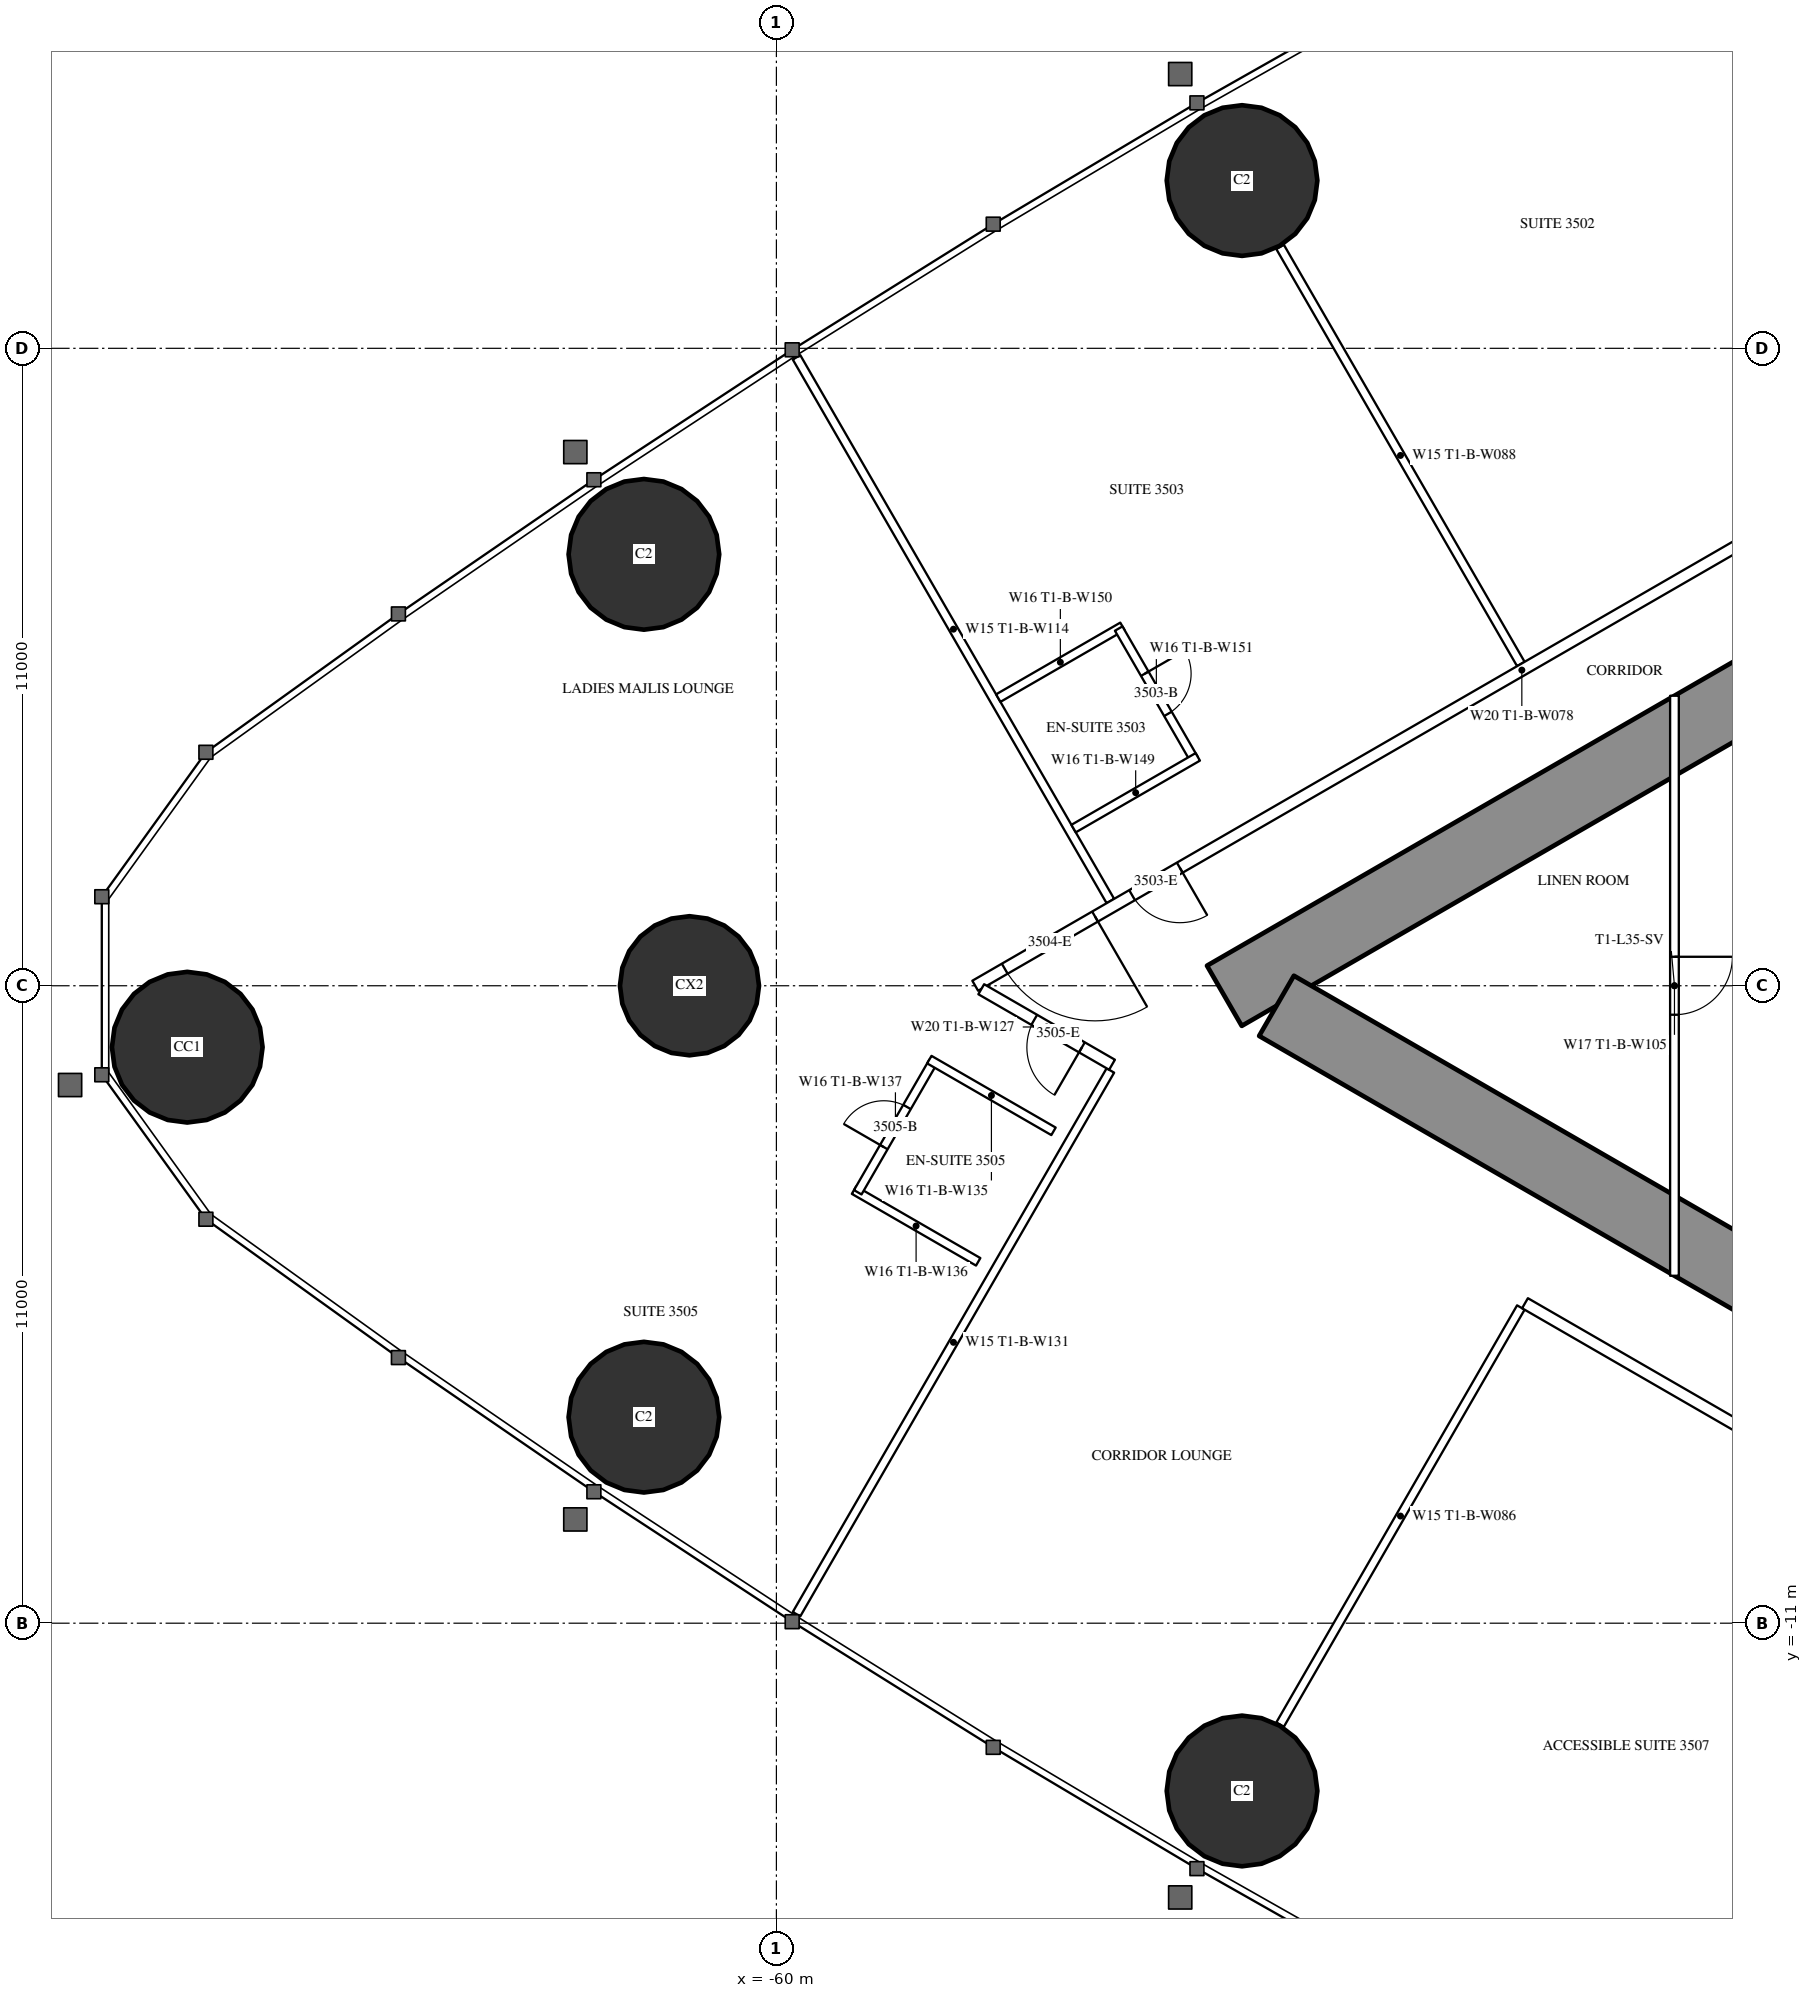
"""IFC4 building model, lengths in metres.
Left out: names, types, materials, properties, quantities, classifications, styles, units other than length and angle.
Written with IfcOpenShell. Run it as: python <this file> out.ifc"""

import sys

from ifc_helpers import new_model, si_unit, direction, frame, frame_2d, origin, origin_2d, place, context, subcontext, project, spatial, rectangle, circle, hollow_circle, extrude, element, fill, save


model = new_model("IFC4")
c1 = context("Model", 3, precision=1e-05, world=origin(), true_north=direction((0.0, 1.0)))
c2 = subcontext(c1, "Body", "Model", "MODEL_VIEW")
j1 = project(units=[si_unit("LENGTHUNIT", "METRE"), si_unit("PLANEANGLEUNIT", "RADIAN")], contexts=[c1])
p1 = place(None, origin())
s1 = spatial("IfcSite", under=j1, at=p1, CompositionType="ELEMENT")
p2 = place(p1, origin())
s2 = spatial("IfcBuilding", under=s1, at=p2, CompositionType="ELEMENT")
p3 = place(p2, frame((0.0, 0.0, 132.6)))
s3 = spatial("IfcBuildingStorey", under=s2, at=p3, CompositionType="ELEMENT", Elevation=132.6)
for number, where, z_axis, x_axis in (
    (1, (-70.168, -1.06, 0.0), (0.0, 0.0, 1.0), (1.0, 0.0, 0.0)),
    (2, (-62.287, -7.445, 0.0), (0.0, 0.0, 1.0), (1.0, 0.0, 0.0)),
    (3, (-51.963, -13.895, 0.0), (0.0, 0.0, 1.0), (1.0, 0.0, 0.0)),
    (4, (-51.963, 13.895, 0.0), (0.0, 0.0, 1.0), (1.0, 0.0, 0.0)),
    (5, (-62.287, 7.445, 0.0), (0.0, 0.0, 1.0), (1.0, 0.0, 0.0)),
):
    element("IfcColumn", number, at=place(p3, frame(where, z_axis=z_axis, x_axis=x_axis)), inside=s3, PredefinedType="COLUMN", context=c2, shape_type="SweptSolid", body=[
        extrude(hollow_circle(Radius=1.3, WallThickness=0.1, at=origin_2d()), origin(), (0.0, 0.0, 1.0), 3.5),
    ])
p4 = place(p3, frame((-61.5, 0.0, 0.0), z_axis=(0.0, 0.0, 1.0), x_axis=(1.0, 0.0, 0.0)))
e6 = element("IfcColumn", 6, at=p4, inside=s3, PredefinedType="COLUMN", context=c2, shape_type="SweptSolid", body=[
    extrude(circle(Radius=1.2, at=origin_2d()), origin(), (0.0, 0.0, 1.0), 3.5),
])
p5 = place(p3, frame((-27.2, 14.3, 0.0), z_axis=(0.0, 0.0, 1.0), x_axis=(-0.866026593062, -0.499997940104, 0.0)))
e7 = element("IfcWall", 7, at=p5, inside=s3, PredefinedType="SHEAR", context=c2, shape_type="SweptSolid", body=[
    extrude(rectangle(XDim=28.946, YDim=1.2, at=frame_2d((14.473, 0.0))), origin(), (0.0, 0.0, 1.0), 3.5),
])
p6 = place(p5, frame((4.6, 0.0, 0.0)))
e8 = element("IfcOpeningElement", 8, at=p6, cuts=e7, PredefinedType="OPENING", context=c2, shape_type="SweptSolid", body=[
    extrude(rectangle(XDim=1.0, YDim=2.2, at=frame_2d((0.5, 1.1))), frame((0.0, 0.61, 0.0), z_axis=(0.0, -1.0, 0.0), x_axis=(1.0, 0.0, 0.0)), (0.0, 0.0, 1.0), 1.22),
])
p7 = place(p5, frame((13.395, 0.0, 0.0)))
e9 = element("IfcOpeningElement", 9, at=p7, cuts=e7, PredefinedType="OPENING", context=c2, shape_type="SweptSolid", body=[
    extrude(rectangle(XDim=1.8, YDim=2.2, at=frame_2d((0.9, 1.1))), frame((0.0, 0.61, 0.0), z_axis=(0.0, -1.0, 0.0), x_axis=(1.0, 0.0, 0.0)), (0.0, 0.0, 1.0), 1.22),
])
p8 = place(p3, frame((-27.2, -14.3, 0.0), z_axis=(0.0, 0.0, 1.0), x_axis=(-0.866024021859, 0.500002393557, 0.0)))
e10 = element("IfcWall", 10, at=p8, inside=s3, PredefinedType="SHEAR", context=c2, shape_type="SweptSolid", body=[
    extrude(rectangle(XDim=27.907, YDim=1.2, at=frame_2d((13.954, 0.0))), origin(), (0.0, 0.0, 1.0), 3.5),
])
p9 = place(p8, frame((4.6, 0.0, 0.0)))
e11 = element("IfcOpeningElement", 11, at=p9, cuts=e10, PredefinedType="OPENING", context=c2, shape_type="SweptSolid", body=[
    extrude(rectangle(XDim=1.0, YDim=2.2, at=frame_2d((0.5, 1.1))), frame((0.0, 0.61, 0.0), z_axis=(0.0, -1.0, 0.0), x_axis=(1.0, 0.0, 0.0)), (0.0, 0.0, 1.0), 1.22),
])
p10 = place(p8, frame((13.395, 0.0, 0.0)))
e12 = element("IfcOpeningElement", 12, at=p10, cuts=e10, PredefinedType="OPENING", context=c2, shape_type="SweptSolid", body=[
    extrude(rectangle(XDim=1.8, YDim=2.2, at=frame_2d((0.9, 1.1))), frame((0.0, 0.61, 0.0), z_axis=(0.0, -1.0, 0.0), x_axis=(1.0, 0.0, 0.0)), (0.0, 0.0, 1.0), 1.22),
])
p11 = place(p3, frame((-47.151, 5.552, 0.0), z_axis=(0.0, 0.0, 1.0), x_axis=(-0.500003012045, 0.866023664773, 0.0)))
e13 = element("IfcWall", 13, at=p11, inside=s3, PredefinedType="PARTITIONING", context=c2, shape_type="SweptSolid", body=[
    extrude(rectangle(XDim=8.311, YDim=0.15, at=frame_2d((4.156, 0.0))), origin(), (0.0, 0.0, 1.0), 2.2),
])
p12 = place(p3, frame((-54.236, 1.462, 0.0), z_axis=(0.0, 0.0, 1.0), x_axis=(-0.499990351854, 0.866030974073, 0.0)))
e14 = element("IfcWall", 14, at=p12, inside=s3, PredefinedType="PARTITIONING", context=c2, shape_type="SweptSolid", body=[
    extrude(rectangle(XDim=10.834, YDim=0.15, at=frame_2d((5.417, 0.0))), origin(), (0.0, 0.0, 1.0), 3.25),
])
p13 = place(p3, frame((-47.151, -5.552, 0.0), z_axis=(0.0, 0.0, 1.0), x_axis=(-0.500003012045, -0.866023664773, 0.0)))
e15 = element("IfcWall", 15, at=p13, inside=s3, PredefinedType="PARTITIONING", context=c2, shape_type="SweptSolid", body=[
    extrude(rectangle(XDim=8.311, YDim=0.15, at=frame_2d((4.156, 0.0))), origin(), (0.0, 0.0, 1.0), 2.2),
])
p14 = place(p3, frame((-54.236, -1.462, 0.0), z_axis=(0.0, 0.0, 1.0), x_axis=(-0.499990351854, -0.866030974073, 0.0)))
e16 = element("IfcWall", 16, at=p14, inside=s3, PredefinedType="PARTITIONING", context=c2, shape_type="SweptSolid", body=[
    extrude(rectangle(XDim=10.834, YDim=0.15, at=frame_2d((5.417, 0.0))), origin(), (0.0, 0.0, 1.0), 3.25),
])
p15 = place(p3, frame((-37.7, 10.894, 0.0), z_axis=(0.0, 0.0, 1.0), x_axis=(-0.866027905338, -0.499995667157, 0.0)))
e17 = element("IfcWall", 17, at=p15, inside=s3, PredefinedType="PARTITIONING", context=c2, shape_type="SweptSolid", body=[
    extrude(rectangle(XDim=21.787, YDim=0.2, at=frame_2d((10.894, 0.0))), origin(), (0.0, 0.0, 1.0), 3.25),
])
p16 = place(p15, frame((17.711, 0.0, 0.0)))
e18 = element("IfcOpeningElement", 18, at=p16, cuts=e17, PredefinedType="OPENING", context=c2, shape_type="SweptSolid", body=[
    extrude(rectangle(XDim=0.95, YDim=2.2, at=frame_2d((0.475, 1.1))), frame((0.0, 0.11, 0.0), z_axis=(0.0, -1.0, 0.0), x_axis=(1.0, 0.0, 0.0)), (0.0, 0.0, 1.0), 0.22),
])
p17 = place(p15, frame((19.399, 0.0, 0.0)))
e19 = element("IfcOpeningElement", 19, at=p17, cuts=e17, PredefinedType="OPENING", context=c2, shape_type="SweptSolid", body=[
    extrude(rectangle(XDim=1.8, YDim=2.2, at=frame_2d((0.9, 1.1))), frame((0.0, 0.11, 0.0), z_axis=(0.0, -1.0, 0.0), x_axis=(1.0, 0.0, 0.0)), (0.0, 0.0, 1.0), 0.22),
])
p18 = place(p15, frame((0.6, 0.0, 0.0)))
e20 = element("IfcOpeningElement", 20, at=p18, cuts=e17, PredefinedType="OPENING", context=c2, shape_type="SweptSolid", body=[
    extrude(rectangle(XDim=0.95, YDim=2.2, at=frame_2d((0.475, 1.1))), frame((0.0, 0.11, 0.0), z_axis=(0.0, -1.0, 0.0), x_axis=(1.0, 0.0, 0.0)), (0.0, 0.0, 1.0), 0.22),
])
p19 = place(p3, frame((-36.92, -11.344, 0.0), z_axis=(0.0, 0.0, 1.0), x_axis=(-0.866027897759, 0.499995680284, 0.0)))
e21 = element("IfcWall", 21, at=p19, inside=s3, PredefinedType="PARTITIONING", context=c2, shape_type="SweptSolid", body=[
    extrude(rectangle(XDim=11.731, YDim=0.2, at=frame_2d((5.865, 0.0))), origin(), (0.0, 0.0, 1.0), 3.25),
])
p20 = place(p19, frame((3.35, 0.0, 0.0)))
e22 = element("IfcOpeningElement", 22, at=p20, cuts=e21, PredefinedType="OPENING", context=c2, shape_type="SweptSolid", body=[
    extrude(rectangle(XDim=1.0, YDim=2.2, at=frame_2d((0.5, 1.1))), frame((0.0, 0.11, 0.0), z_axis=(0.0, -1.0, 0.0), x_axis=(1.0, 0.0, 0.0)), (0.0, 0.0, 1.0), 0.22),
])
p21 = place(p3, frame((-54.207, -1.363, 0.0), z_axis=(0.0, 0.0, 1.0), x_axis=(-0.866049872286, 0.499957616916, 0.0)))
e23 = element("IfcWall", 23, at=p21, inside=s3, PredefinedType="PARTITIONING", context=c2, shape_type="SweptSolid", body=[
    extrude(rectangle(XDim=2.606, YDim=0.2, at=frame_2d((1.303, 0.0))), origin(), (0.0, 0.0, 1.0), 3.25),
])
p22 = place(p21, frame((0.6, 0.0, 0.0)))
e24 = element("IfcOpeningElement", 24, at=p22, cuts=e23, PredefinedType="OPENING", context=c2, shape_type="SweptSolid", body=[
    extrude(rectangle(XDim=0.95, YDim=2.2, at=frame_2d((0.475, 1.1))), frame((0.0, 0.11, 0.0), z_axis=(0.0, -1.0, 0.0), x_axis=(1.0, 0.0, 0.0)), (0.0, 0.0, 1.0), 0.22),
])
p23 = place(p3, frame((-54.027, 6.201, 0.0), z_axis=(0.0, 0.0, 1.0), x_axis=(-0.866006523861, -0.500032699561, 0.0)))
e25 = element("IfcWall", 25, at=p23, inside=s3, PredefinedType="PARTITIONING", context=c2, shape_type="SweptSolid", body=[
    extrude(rectangle(XDim=2.475, YDim=0.15, at=frame_2d((1.237, 0.0))), origin(), (0.0, 0.0, 1.0), 3.25),
])
p24 = place(p3, frame((-52.792, 3.912, 0.0), z_axis=(0.0, 0.0, 1.0), x_axis=(-0.500006934395, 0.866021400173, 0.0)))
e26 = element("IfcWall", 26, at=p24, inside=s3, PredefinedType="PARTITIONING", context=c2, shape_type="SweptSolid", body=[
    extrude(rectangle(XDim=2.6, YDim=0.15, at=frame_2d((1.3, 0.0))), origin(), (0.0, 0.0, 1.0), 3.25),
])
p25 = place(p24, frame((0.9, 0.0, 0.0)))
e27 = element("IfcOpeningElement", 27, at=p25, cuts=e26, PredefinedType="OPENING", context=c2, shape_type="SweptSolid", body=[
    extrude(rectangle(XDim=0.8, YDim=2.2, at=frame_2d((0.4, 1.1))), frame((0.0, 0.085, 0.0), z_axis=(0.0, -1.0, 0.0), x_axis=(1.0, 0.0, 0.0)), (0.0, 0.0, 1.0), 0.17),
])
p26 = place(p3, frame((-52.727, 3.95, 0.0), z_axis=(0.0, 0.0, 1.0), x_axis=(-0.866006523861, -0.500032699561, 0.0)))
e28 = element("IfcWall", 28, at=p26, inside=s3, PredefinedType="PARTITIONING", context=c2, shape_type="SweptSolid", body=[
    extrude(rectangle(XDim=2.475, YDim=0.15, at=frame_2d((1.237, 0.0))), origin(), (0.0, 0.0, 1.0), 3.25),
])
p27 = place(p3, frame((-56.517, -4.764, 0.0), z_axis=(0.0, 0.0, 1.0), x_axis=(-0.866031185235, 0.4999899861, 0.0)))
e29 = element("IfcWall", 29, at=p27, inside=s3, PredefinedType="PARTITIONING", context=c2, shape_type="SweptSolid", body=[
    extrude(rectangle(XDim=2.475, YDim=0.15, at=frame_2d((1.238, 0.0))), origin(), (0.0, 0.0, 1.0), 3.25),
])
p28 = place(p3, frame((-57.296, -1.312, 0.0), z_axis=(0.0, 0.0, 1.0), x_axis=(-0.49997716683, -0.86603858612, 0.0)))
e30 = element("IfcWall", 30, at=p28, inside=s3, PredefinedType="PARTITIONING", context=c2, shape_type="SweptSolid", body=[
    extrude(rectangle(XDim=2.6, YDim=0.15, at=frame_2d((1.3, 0.0))), origin(), (0.0, 0.0, 1.0), 3.25),
])
p29 = place(p28, frame((0.9, 0.0, 0.0)))
e31 = element("IfcOpeningElement", 31, at=p29, cuts=e30, PredefinedType="OPENING", context=c2, shape_type="SweptSolid", body=[
    extrude(rectangle(XDim=0.8, YDim=2.2, at=frame_2d((0.4, 1.1))), frame((0.0, 0.085, 0.0), z_axis=(0.0, -1.0, 0.0), x_axis=(1.0, 0.0, 0.0)), (0.0, 0.0, 1.0), 0.17),
])
p30 = place(p3, frame((-55.217, -2.512, 0.0), z_axis=(0.0, 0.0, 1.0), x_axis=(-0.866031185235, 0.4999899861, 0.0)))
e32 = element("IfcWall", 32, at=p30, inside=s3, PredefinedType="PARTITIONING", context=c2, shape_type="SweptSolid", body=[
    extrude(rectangle(XDim=2.475, YDim=0.15, at=frame_2d((1.238, 0.0))), origin(), (0.0, 0.0, 1.0), 3.25),
])
p31 = place(p3, frame((-44.5, 5.005, 0.0), z_axis=(0.0, 0.0, 1.0), x_axis=(0.0, -1.0, 0.0)))
e33 = element("IfcWall", 33, at=p31, inside=s3, PredefinedType="PARTITIONING", context=c2, shape_type="SweptSolid", body=[
    extrude(rectangle(XDim=10.009, YDim=0.15, at=frame_2d((5.005, 0.0))), origin(), (0.0, 0.0, 1.0), 2.45),
])
p32 = place(p31, frame((4.505, 0.0, 0.0)))
e34 = element("IfcOpeningElement", 34, at=p32, cuts=e33, PredefinedType="OPENING", context=c2, shape_type="SweptSolid", body=[
    extrude(rectangle(XDim=1.0, YDim=2.2, at=frame_2d((0.5, 1.1))), frame((0.0, 0.085, 0.0), z_axis=(0.0, -1.0, 0.0), x_axis=(1.0, 0.0, 0.0)), (0.0, 0.0, 1.0), 0.17),
])
p33 = place(p25, origin())
e35 = element("IfcDoor", 35, at=p33, inside=s3, OperationType="SINGLE_SWING_RIGHT", PredefinedType="DOOR", context=c2, shape_type="SweptSolid", body=[
    extrude(rectangle(XDim=0.8, YDim=2.2, at=frame_2d((0.4, 1.1))), frame((0.0, 0.025, 0.0), z_axis=(0.0, -1.0, 0.0), x_axis=(1.0, 0.0, 0.0)), (0.0, 0.0, 1.0), 0.05),
])
fill(e27, e35)
p34 = place(p16, origin())
e36 = element("IfcDoor", 36, at=p34, inside=s3, OperationType="SINGLE_SWING_LEFT", PredefinedType="DOOR", context=c2, shape_type="SweptSolid", body=[
    extrude(rectangle(XDim=0.95, YDim=2.2, at=frame_2d((0.475, 1.1))), frame((0.0, 0.025, 0.0), z_axis=(0.0, -1.0, 0.0), x_axis=(1.0, 0.0, 0.0)), (0.0, 0.0, 1.0), 0.05),
])
fill(e18, e36)
p35 = place(p17, origin())
e37 = element("IfcDoor", 37, at=p35, inside=s3, OperationType="DOUBLE_DOOR_SINGLE_SWING", PredefinedType="DOOR", context=c2, shape_type="SweptSolid", body=[
    extrude(rectangle(XDim=1.8, YDim=2.2, at=frame_2d((0.9, 1.1))), frame((0.0, 0.025, 0.0), z_axis=(0.0, -1.0, 0.0), x_axis=(1.0, 0.0, 0.0)), (0.0, 0.0, 1.0), 0.05),
])
fill(e19, e37)
p36 = place(p29, origin())
e38 = element("IfcDoor", 38, at=p36, inside=s3, OperationType="SINGLE_SWING_RIGHT", PredefinedType="DOOR", context=c2, shape_type="SweptSolid", body=[
    extrude(rectangle(XDim=0.8, YDim=2.2, at=frame_2d((0.4, 1.1))), frame((0.0, 0.025, 0.0), z_axis=(0.0, -1.0, 0.0), x_axis=(1.0, 0.0, 0.0)), (0.0, 0.0, 1.0), 0.05),
])
fill(e31, e38)
p37 = place(p22, origin())
e39 = element("IfcDoor", 39, at=p37, inside=s3, OperationType="SINGLE_SWING_LEFT", PredefinedType="DOOR", context=c2, shape_type="SweptSolid", body=[
    extrude(rectangle(XDim=0.95, YDim=2.2, at=frame_2d((0.475, 1.1))), frame((0.0, 0.025, 0.0), z_axis=(0.0, -1.0, 0.0), x_axis=(1.0, 0.0, 0.0)), (0.0, 0.0, 1.0), 0.05),
])
fill(e24, e39)
p38 = place(p32, origin())
e40 = element("IfcDoor", 40, at=p38, inside=s3, OperationType="SINGLE_SWING_LEFT", PredefinedType="DOOR", context=c2, shape_type="SweptSolid", body=[
    extrude(rectangle(XDim=1.0, YDim=2.2, at=frame_2d((0.5, 1.1))), frame((0.0, 0.025, 0.0), z_axis=(0.0, -1.0, 0.0), x_axis=(1.0, 0.0, 0.0)), (0.0, 0.0, 1.0), 0.05),
])
fill(e34, e40)
save(model, sys.argv[1])
